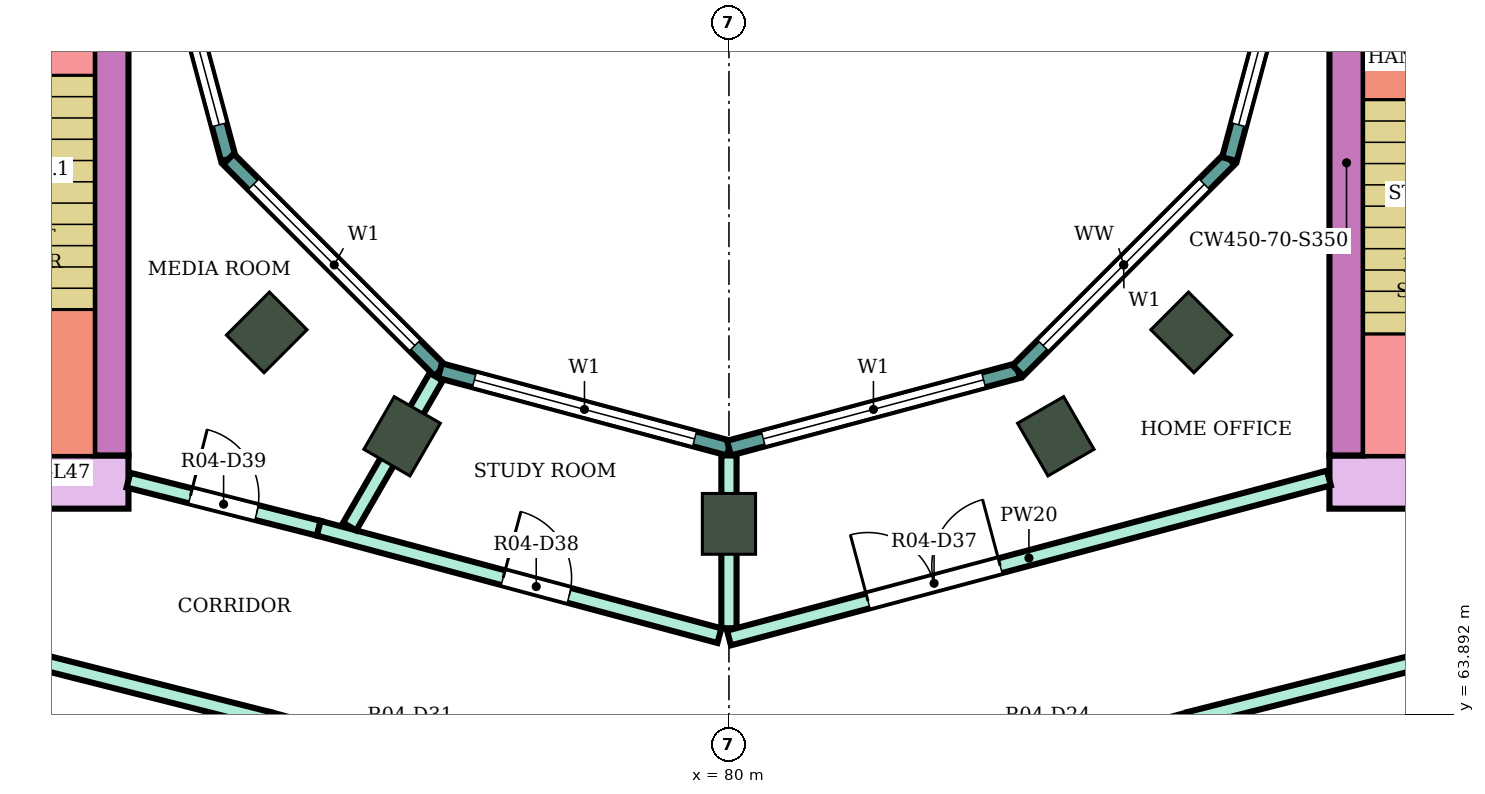
"""IFC4 building model, lengths in metres.
Left out: names, types, materials, properties, quantities, classifications, styles, units other than length and angle.
Written with IfcOpenShell. Run it as: python <this file> out.ifc"""

import sys

from ifc_helpers import new_model, si_unit, direction, frame, frame_2d, origin, origin_2d, place, context, subcontext, project, spatial, rectangle, extrude, element, fill, save


model = new_model("IFC4")
c1 = context("Model", 3, precision=1e-05, world=origin(), true_north=direction((0.0, 1.0)))
c2 = subcontext(c1, "Body", "Model", "MODEL_VIEW")
j1 = project(units=[si_unit("LENGTHUNIT", "METRE"), si_unit("PLANEANGLEUNIT", "RADIAN")], contexts=[c1])
p1 = place(None, origin())
s1 = spatial("IfcSite", under=j1, at=p1, CompositionType="ELEMENT")
p2 = place(p1, origin())
s2 = spatial("IfcBuilding", under=s1, at=p2, CompositionType="ELEMENT")
p3 = place(p2, frame((0.0, 0.0, 202.8)))
s3 = spatial("IfcBuildingStorey", under=s2, at=p3, CompositionType="ELEMENT", Elevation=202.8)
for number, where, z_axis, x_axis in (
    (1, (73.919, 68.919, 0.0), (0.0, 0.0, 1.0), (-0.707, -0.707, 0.0)),
    (2, (75.7, 67.552, 0.0), (0.0, 0.0, 1.0), (-0.5, -0.866, 0.0)),
    (3, (80.0, 66.4, 0.0), (0.0, 0.0, 1.0), (0.0, -1.0, 0.0)),
    (4, (84.3, 67.552, 0.0), (0.0, 0.0, 1.0), (0.5, -0.866, 0.0)),
    (5, (86.081, 68.919, 0.0), (0.0, 0.0, 1.0), (0.707, -0.707, 0.0)),
):
    element("IfcColumn", number, at=place(p3, frame(where, z_axis=z_axis, x_axis=x_axis)), inside=s3, PredefinedType="COLUMN", context=c2, shape_type="SweptSolid", body=[
        extrude(rectangle(XDim=0.8, YDim=0.7, at=origin_2d()), origin(), (0.0, 0.0, 1.0), 4.1),
    ])
p4 = place(p3, frame((87.9, 66.95, 0.0), z_axis=(0.0, 0.0, 1.0), x_axis=(1.0, 0.0, 0.0)))
e6 = element("IfcWall", 6, at=p4, inside=s3, PredefinedType="SHEAR", context=c2, shape_type="SweptSolid", body=[
    extrude(rectangle(XDim=14.8, YDim=0.7, at=frame_2d((7.4, 0.0))), origin(), (0.0, 0.0, 1.0), 3.75),
])
p5 = place(p4, frame((4.2, 0.0, 0.0)))
e7 = element("IfcOpeningElement", 7, at=p5, cuts=e6, PredefinedType="OPENING", context=c2, shape_type="SweptSolid", body=[
    extrude(rectangle(XDim=2.4, YDim=2.4, at=frame_2d((1.2, 1.2))), frame((0.0, 0.36, 0.0), z_axis=(0.0, -1.0, 0.0), x_axis=(1.0, 0.0, 0.0)), (0.0, 0.0, 1.0), 0.72),
])
p6 = place(p3, frame((88.125, 67.3, 0.0), z_axis=(0.0, 0.0, 1.0), x_axis=(0.0, 1.0, 0.0)))
e8 = element("IfcWall", 8, at=p6, inside=s3, PredefinedType="SHEAR", context=c2, shape_type="SweptSolid", body=[
    extrude(rectangle(XDim=7.7, YDim=0.45, at=frame_2d((3.85, 0.0))), origin(), (0.0, 0.0, 1.0), 3.75),
])
p7 = place(p3, frame((72.1, 66.95, 0.0), z_axis=(0.0, 0.0, 1.0), x_axis=(-1.0, 0.0, 0.0)))
e9 = element("IfcWall", 9, at=p7, inside=s3, PredefinedType="SHEAR", context=c2, shape_type="SweptSolid", body=[
    extrude(rectangle(XDim=14.8, YDim=0.7, at=frame_2d((7.4, 0.0))), origin(), (0.0, 0.0, 1.0), 3.75),
])
p8 = place(p7, frame((4.2, 0.0, 0.0)))
e10 = element("IfcOpeningElement", 10, at=p8, cuts=e9, PredefinedType="OPENING", context=c2, shape_type="SweptSolid", body=[
    extrude(rectangle(XDim=2.4, YDim=2.4, at=frame_2d((1.2, 1.2))), frame((0.0, 0.36, 0.0), z_axis=(0.0, -1.0, 0.0), x_axis=(1.0, 0.0, 0.0)), (0.0, 0.0, 1.0), 0.72),
])
p9 = place(p3, frame((71.875, 75.0, 0.0), z_axis=(0.0, 0.0, 1.0), x_axis=(0.0, -1.0, 0.0)))
e11 = element("IfcWall", 11, at=p9, inside=s3, PredefinedType="SHEAR", context=c2, shape_type="SweptSolid", body=[
    extrude(rectangle(XDim=7.7, YDim=0.45, at=frame_2d((3.85, 0.0))), origin(), (0.0, 0.0, 1.0), 3.75),
])
p10 = place(p3, frame((72.396, 75.0, 0.0), z_axis=(0.0, 0.0, 1.0), x_axis=(0.258789828301, -0.965933654434, 0.0)))
e12 = element("IfcWall", 12, at=p10, inside=s3, PredefinedType="NOTDEFINED", context=c2, shape_type="SweptSolid", body=[
    extrude(rectangle(XDim=3.936, YDim=0.2, at=frame_2d((1.968, 0.0))), origin(), (0.0, 0.0, 1.0), 4.1),
])
p11 = place(p10, frame((0.468, 0.0, 0.9)))
e13 = element("IfcOpeningElement", 13, at=p11, cuts=e12, PredefinedType="OPENING", context=c2, shape_type="SweptSolid", body=[
    extrude(rectangle(XDim=3.0, YDim=2.3, at=frame_2d((1.5, 1.15))), frame((0.0, 0.11, 0.0), z_axis=(0.0, -1.0, 0.0), x_axis=(1.0, 0.0, 0.0)), (0.0, 0.0, 1.0), 0.22),
])
p12 = place(p3, frame((73.415, 71.198, 0.0), z_axis=(0.0, 0.0, 1.0), x_axis=(0.707106781187, -0.707106781187, 0.0)))
e14 = element("IfcWall", 14, at=p12, inside=s3, PredefinedType="NOTDEFINED", context=c2, shape_type="SweptSolid", body=[
    extrude(rectangle(XDim=3.936, YDim=0.2, at=frame_2d((1.968, 0.0))), origin(), (0.0, 0.0, 1.0), 4.1),
])
p13 = place(p12, frame((0.468, 0.0, 0.9)))
e15 = element("IfcOpeningElement", 15, at=p13, cuts=e14, PredefinedType="OPENING", context=c2, shape_type="SweptSolid", body=[
    extrude(rectangle(XDim=3.0, YDim=2.3, at=frame_2d((1.5, 1.15))), frame((0.0, 0.11, 0.0), z_axis=(0.0, -1.0, 0.0), x_axis=(1.0, 0.0, 0.0)), (0.0, 0.0, 1.0), 0.22),
])
p14 = place(p3, frame((76.198, 68.415, 0.0), z_axis=(0.0, 0.0, 1.0), x_axis=(0.965933654434, -0.258789828301, 0.0)))
e16 = element("IfcWall", 16, at=p14, inside=s3, PredefinedType="NOTDEFINED", context=c2, shape_type="SweptSolid", body=[
    extrude(rectangle(XDim=3.936, YDim=0.2, at=frame_2d((1.968, 0.0))), origin(), (0.0, 0.0, 1.0), 4.1),
])
p15 = place(p14, frame((0.468, 0.0, 0.9)))
e17 = element("IfcOpeningElement", 17, at=p15, cuts=e16, PredefinedType="OPENING", context=c2, shape_type="SweptSolid", body=[
    extrude(rectangle(XDim=3.0, YDim=2.3, at=frame_2d((1.5, 1.15))), frame((0.0, 0.11, 0.0), z_axis=(0.0, -1.0, 0.0), x_axis=(1.0, 0.0, 0.0)), (0.0, 0.0, 1.0), 0.22),
])
p16 = place(p3, frame((80.0, 67.396, 0.0), z_axis=(0.0, 0.0, 1.0), x_axis=(0.965933654434, 0.258789828301, 0.0)))
e18 = element("IfcWall", 18, at=p16, inside=s3, PredefinedType="NOTDEFINED", context=c2, shape_type="SweptSolid", body=[
    extrude(rectangle(XDim=3.936, YDim=0.2, at=frame_2d((1.968, 0.0))), origin(), (0.0, 0.0, 1.0), 4.1),
])
p17 = place(p16, frame((0.468, 0.0, 0.9)))
e19 = element("IfcOpeningElement", 19, at=p17, cuts=e18, PredefinedType="OPENING", context=c2, shape_type="SweptSolid", body=[
    extrude(rectangle(XDim=3.0, YDim=2.3, at=frame_2d((1.5, 1.15))), frame((0.0, 0.11, 0.0), z_axis=(0.0, -1.0, 0.0), x_axis=(1.0, 0.0, 0.0)), (0.0, 0.0, 1.0), 0.22),
])
p18 = place(p3, frame((83.802, 68.415, 0.0), z_axis=(0.0, 0.0, 1.0), x_axis=(0.707106781187, 0.707106781187, 0.0)))
e20 = element("IfcWall", 20, at=p18, inside=s3, PredefinedType="NOTDEFINED", context=c2, shape_type="SweptSolid", body=[
    extrude(rectangle(XDim=3.936, YDim=0.2, at=frame_2d((1.968, 0.0))), origin(), (0.0, 0.0, 1.0), 4.1),
])
p19 = place(p18, frame((0.468, 0.0, 0.9)))
e21 = element("IfcOpeningElement", 21, at=p19, cuts=e20, PredefinedType="OPENING", context=c2, shape_type="SweptSolid", body=[
    extrude(rectangle(XDim=3.0, YDim=2.3, at=frame_2d((1.5, 1.15))), frame((0.0, 0.11, 0.0), z_axis=(0.0, -1.0, 0.0), x_axis=(1.0, 0.0, 0.0)), (0.0, 0.0, 1.0), 0.22),
])
p20 = place(p3, frame((86.585, 71.198, 0.0), z_axis=(0.0, 0.0, 1.0), x_axis=(0.258789828301, 0.965933654434, 0.0)))
e22 = element("IfcWall", 22, at=p20, inside=s3, PredefinedType="NOTDEFINED", context=c2, shape_type="SweptSolid", body=[
    extrude(rectangle(XDim=3.936, YDim=0.2, at=frame_2d((1.968, 0.0))), origin(), (0.0, 0.0, 1.0), 4.1),
])
p21 = place(p20, frame((0.468, 0.0, 0.9)))
e23 = element("IfcOpeningElement", 23, at=p21, cuts=e22, PredefinedType="OPENING", context=c2, shape_type="SweptSolid", body=[
    extrude(rectangle(XDim=3.0, YDim=2.3, at=frame_2d((1.5, 1.15))), frame((0.0, 0.11, 0.0), z_axis=(0.0, -1.0, 0.0), x_axis=(1.0, 0.0, 0.0)), (0.0, 0.0, 1.0), 0.22),
])
p22 = place(p3, frame((68.2, 65.28, 0.0), z_axis=(0.0, 0.0, 1.0), x_axis=(0.969450596516, -0.245286650503, 0.0)))
e24 = element("IfcWall", 24, at=p22, inside=s3, PredefinedType="PARTITIONING", context=c2, shape_type="SweptSolid", body=[
    extrude(rectangle(XDim=5.928, YDim=0.2, at=frame_2d((2.964, 0.0))), origin(), (0.0, 0.0, 1.0), 3.65),
])
p23 = place(p3, frame((72.1, 66.975, 0.0), z_axis=(0.0, 0.0, 1.0), x_axis=(0.969471314457, -0.245204752086, 0.0)))
e25 = element("IfcWall", 25, at=p23, inside=s3, PredefinedType="PARTITIONING", context=c2, shape_type="SweptSolid", body=[
    extrude(rectangle(XDim=2.582, YDim=0.2, at=frame_2d((1.291, 0.0))), origin(), (0.0, 0.0, 1.0), 3.65),
])
p24 = place(p23, frame((0.841, 0.0, 0.0)))
e26 = element("IfcOpeningElement", 26, at=p24, cuts=e25, PredefinedType="OPENING", context=c2, shape_type="SweptSolid", body=[
    extrude(rectangle(XDim=0.9, YDim=2.1, at=frame_2d((0.45, 1.05))), frame((0.0, 0.11, 0.0), z_axis=(0.0, -1.0, 0.0), x_axis=(1.0, 0.0, 0.0)), (0.0, 0.0, 1.0), 0.22),
])
p25 = place(p3, frame((73.947, 63.826, 0.0), z_axis=(0.0, 0.0, 1.0), x_axis=(0.965908253407, -0.258884619088, 0.0)))
e27 = element("IfcWall", 27, at=p25, inside=s3, PredefinedType="PARTITIONING", context=c2, shape_type="SweptSolid", body=[
    extrude(rectangle(XDim=6.217, YDim=0.2, at=frame_2d((3.108, 0.0))), origin(), (0.0, 0.0, 1.0), 3.65),
])
p26 = place(p25, frame((1.424, 0.0, 0.0)))
e28 = element("IfcOpeningElement", 28, at=p26, cuts=e27, PredefinedType="OPENING", context=c2, shape_type="SweptSolid", body=[
    extrude(rectangle(XDim=1.0, YDim=2.1, at=frame_2d((0.5, 1.05))), frame((0.0, 0.11, 0.0), z_axis=(0.0, -1.0, 0.0), x_axis=(1.0, 0.0, 0.0)), (0.0, 0.0, 1.0), 0.22),
])
p27 = place(p3, frame((74.603, 66.342, 0.0), z_axis=(0.0, 0.0, 1.0), x_axis=(0.965920893652, -0.258837453254, 0.0)))
e29 = element("IfcWall", 29, at=p27, inside=s3, PredefinedType="PARTITIONING", context=c2, shape_type="SweptSolid", body=[
    extrude(rectangle(XDim=5.458, YDim=0.2, at=frame_2d((2.729, 0.0))), origin(), (0.0, 0.0, 1.0), 3.65),
])
p28 = place(p27, frame((2.512, 0.0, 0.0)))
e30 = element("IfcOpeningElement", 30, at=p28, cuts=e29, PredefinedType="OPENING", context=c2, shape_type="SweptSolid", body=[
    extrude(rectangle(XDim=0.9, YDim=2.1, at=frame_2d((0.45, 1.05))), frame((0.0, 0.11, 0.0), z_axis=(0.0, -1.0, 0.0), x_axis=(1.0, 0.0, 0.0)), (0.0, 0.0, 1.0), 0.22),
])
p29 = place(p3, frame((75.01, 66.364, 0.0), z_axis=(0.0, 0.0, 1.0), x_axis=(0.500097042406, 0.865969369075, 0.0)))
e31 = element("IfcWall", 31, at=p29, inside=s3, PredefinedType="PARTITIONING", context=c2, shape_type="SweptSolid", body=[
    extrude(rectangle(XDim=2.275, YDim=0.2, at=frame_2d((1.138, 0.0))), origin(), (0.0, 0.0, 1.0), 3.65),
])
p30 = place(p3, frame((80.048, 62.217, 0.0), z_axis=(0.0, 0.0, 1.0), x_axis=(0.966097920642, 0.258175923996, 0.0)))
e32 = element("IfcWall", 32, at=p30, inside=s3, PredefinedType="PARTITIONING", context=c2, shape_type="SweptSolid", body=[
    extrude(rectangle(XDim=6.217, YDim=0.2, at=frame_2d((3.108, 0.0))), origin(), (0.0, 0.0, 1.0), 3.65),
])
p31 = place(p30, frame((3.792, 0.0, 0.0)))
e33 = element("IfcOpeningElement", 33, at=p31, cuts=e32, PredefinedType="OPENING", context=c2, shape_type="SweptSolid", body=[
    extrude(rectangle(XDim=1.0, YDim=2.1, at=frame_2d((0.5, 1.05))), frame((0.0, 0.11, 0.0), z_axis=(0.0, -1.0, 0.0), x_axis=(1.0, 0.0, 0.0)), (0.0, 0.0, 1.0), 0.22),
])
p32 = place(p3, frame((80.0, 65.027, 0.0), z_axis=(0.0, 0.0, 1.0), x_axis=(0.0, 1.0, 0.0)))
e34 = element("IfcWall", 34, at=p32, inside=s3, PredefinedType="PARTITIONING", context=c2, shape_type="SweptSolid", body=[
    extrude(rectangle(XDim=2.273, YDim=0.2, at=frame_2d((1.136, 0.0))), origin(), (0.0, 0.0, 1.0), 3.65),
])
p33 = place(p3, frame((80.0, 64.898, 0.0), z_axis=(0.0, 0.0, 1.0), x_axis=(0.966236923997, 0.25765520896, 0.0)))
e35 = element("IfcWall", 35, at=p33, inside=s3, PredefinedType="PARTITIONING", context=c2, shape_type="SweptSolid", body=[
    extrude(rectangle(XDim=8.168, YDim=0.2, at=frame_2d((4.084, 0.0))), origin(), (0.0, 0.0, 1.0), 3.65),
])
p34 = place(p33, frame((1.893, 0.0, 0.0)))
e36 = element("IfcOpeningElement", 36, at=p34, cuts=e35, PredefinedType="OPENING", context=c2, shape_type="SweptSolid", body=[
    extrude(rectangle(XDim=1.8, YDim=2.1, at=frame_2d((0.9, 1.05))), frame((0.0, 0.11, 0.0), z_axis=(0.0, -1.0, 0.0), x_axis=(1.0, 0.0, 0.0)), (0.0, 0.0, 1.0), 0.22),
])
p35 = place(p3, frame((86.053, 63.826, 0.0), z_axis=(0.0, 0.0, 1.0), x_axis=(0.969490004987, 0.245130843083, 0.0)))
e37 = element("IfcWall", 37, at=p35, inside=s3, PredefinedType="PARTITIONING", context=c2, shape_type="SweptSolid", body=[
    extrude(rectangle(XDim=5.908, YDim=0.2, at=frame_2d((2.954, 0.0))), origin(), (0.0, 0.0, 1.0), 3.65),
])
p36 = place(p11, origin())
e38 = element("IfcWindow", 38, at=p36, inside=s3, PartitioningType="SINGLE_PANEL", PredefinedType="WINDOW", context=c2, shape_type="SweptSolid", body=[
    extrude(rectangle(XDim=3.0, YDim=2.3, at=frame_2d((1.5, 1.15))), frame((0.0, 0.03, 0.0), z_axis=(0.0, -1.0, 0.0), x_axis=(1.0, 0.0, 0.0)), (0.0, 0.0, 1.0), 0.06),
])
fill(e13, e38)
p37 = place(p13, origin())
e39 = element("IfcWindow", 39, at=p37, inside=s3, PartitioningType="SINGLE_PANEL", PredefinedType="WINDOW", context=c2, shape_type="SweptSolid", body=[
    extrude(rectangle(XDim=3.0, YDim=2.3, at=frame_2d((1.5, 1.15))), frame((0.0, 0.03, 0.0), z_axis=(0.0, -1.0, 0.0), x_axis=(1.0, 0.0, 0.0)), (0.0, 0.0, 1.0), 0.06),
])
fill(e15, e39)
p38 = place(p15, origin())
e40 = element("IfcWindow", 40, at=p38, inside=s3, PartitioningType="SINGLE_PANEL", PredefinedType="WINDOW", context=c2, shape_type="SweptSolid", body=[
    extrude(rectangle(XDim=3.0, YDim=2.3, at=frame_2d((1.5, 1.15))), frame((0.0, 0.03, 0.0), z_axis=(0.0, -1.0, 0.0), x_axis=(1.0, 0.0, 0.0)), (0.0, 0.0, 1.0), 0.06),
])
fill(e17, e40)
p39 = place(p17, origin())
e41 = element("IfcWindow", 41, at=p39, inside=s3, PartitioningType="SINGLE_PANEL", PredefinedType="WINDOW", context=c2, shape_type="SweptSolid", body=[
    extrude(rectangle(XDim=3.0, YDim=2.3, at=frame_2d((1.5, 1.15))), frame((0.0, 0.03, 0.0), z_axis=(0.0, -1.0, 0.0), x_axis=(1.0, 0.0, 0.0)), (0.0, 0.0, 1.0), 0.06),
])
fill(e19, e41)
p40 = place(p19, origin())
e42 = element("IfcWindow", 42, at=p40, inside=s3, PartitioningType="SINGLE_PANEL", PredefinedType="WINDOW", context=c2, shape_type="SweptSolid", body=[
    extrude(rectangle(XDim=3.0, YDim=2.3, at=frame_2d((1.5, 1.15))), frame((0.0, 0.03, 0.0), z_axis=(0.0, -1.0, 0.0), x_axis=(1.0, 0.0, 0.0)), (0.0, 0.0, 1.0), 0.06),
])
fill(e21, e42)
p41 = place(p21, origin())
e43 = element("IfcWindow", 43, at=p41, inside=s3, PartitioningType="SINGLE_PANEL", PredefinedType="WINDOW", context=c2, shape_type="SweptSolid", body=[
    extrude(rectangle(XDim=3.0, YDim=2.3, at=frame_2d((1.5, 1.15))), frame((0.0, 0.03, 0.0), z_axis=(0.0, -1.0, 0.0), x_axis=(1.0, 0.0, 0.0)), (0.0, 0.0, 1.0), 0.06),
])
fill(e23, e43)
p42 = place(p34, origin())
e44 = element("IfcDoor", 44, at=p42, inside=s3, OperationType="DOUBLE_DOOR_SINGLE_SWING", PredefinedType="DOOR", context=c2, shape_type="SweptSolid", body=[
    extrude(rectangle(XDim=1.8, YDim=2.1, at=frame_2d((0.9, 1.05))), frame((0.0, 0.025, 0.0), z_axis=(0.0, -1.0, 0.0), x_axis=(1.0, 0.0, 0.0)), (0.0, 0.0, 1.0), 0.05),
])
fill(e36, e44)
p43 = place(p28, origin())
e45 = element("IfcDoor", 45, at=p43, inside=s3, OperationType="SINGLE_SWING_LEFT", PredefinedType="DOOR", context=c2, shape_type="SweptSolid", body=[
    extrude(rectangle(XDim=0.9, YDim=2.1, at=frame_2d((0.45, 1.05))), frame((0.0, 0.025, 0.0), z_axis=(0.0, -1.0, 0.0), x_axis=(1.0, 0.0, 0.0)), (0.0, 0.0, 1.0), 0.05),
])
fill(e30, e45)
p44 = place(p24, origin())
e46 = element("IfcDoor", 46, at=p44, inside=s3, OperationType="SINGLE_SWING_LEFT", PredefinedType="DOOR", context=c2, shape_type="SweptSolid", body=[
    extrude(rectangle(XDim=0.9, YDim=2.1, at=frame_2d((0.45, 1.05))), frame((0.0, 0.025, 0.0), z_axis=(0.0, -1.0, 0.0), x_axis=(1.0, 0.0, 0.0)), (0.0, 0.0, 1.0), 0.05),
])
fill(e26, e46)
save(model, sys.argv[1])
